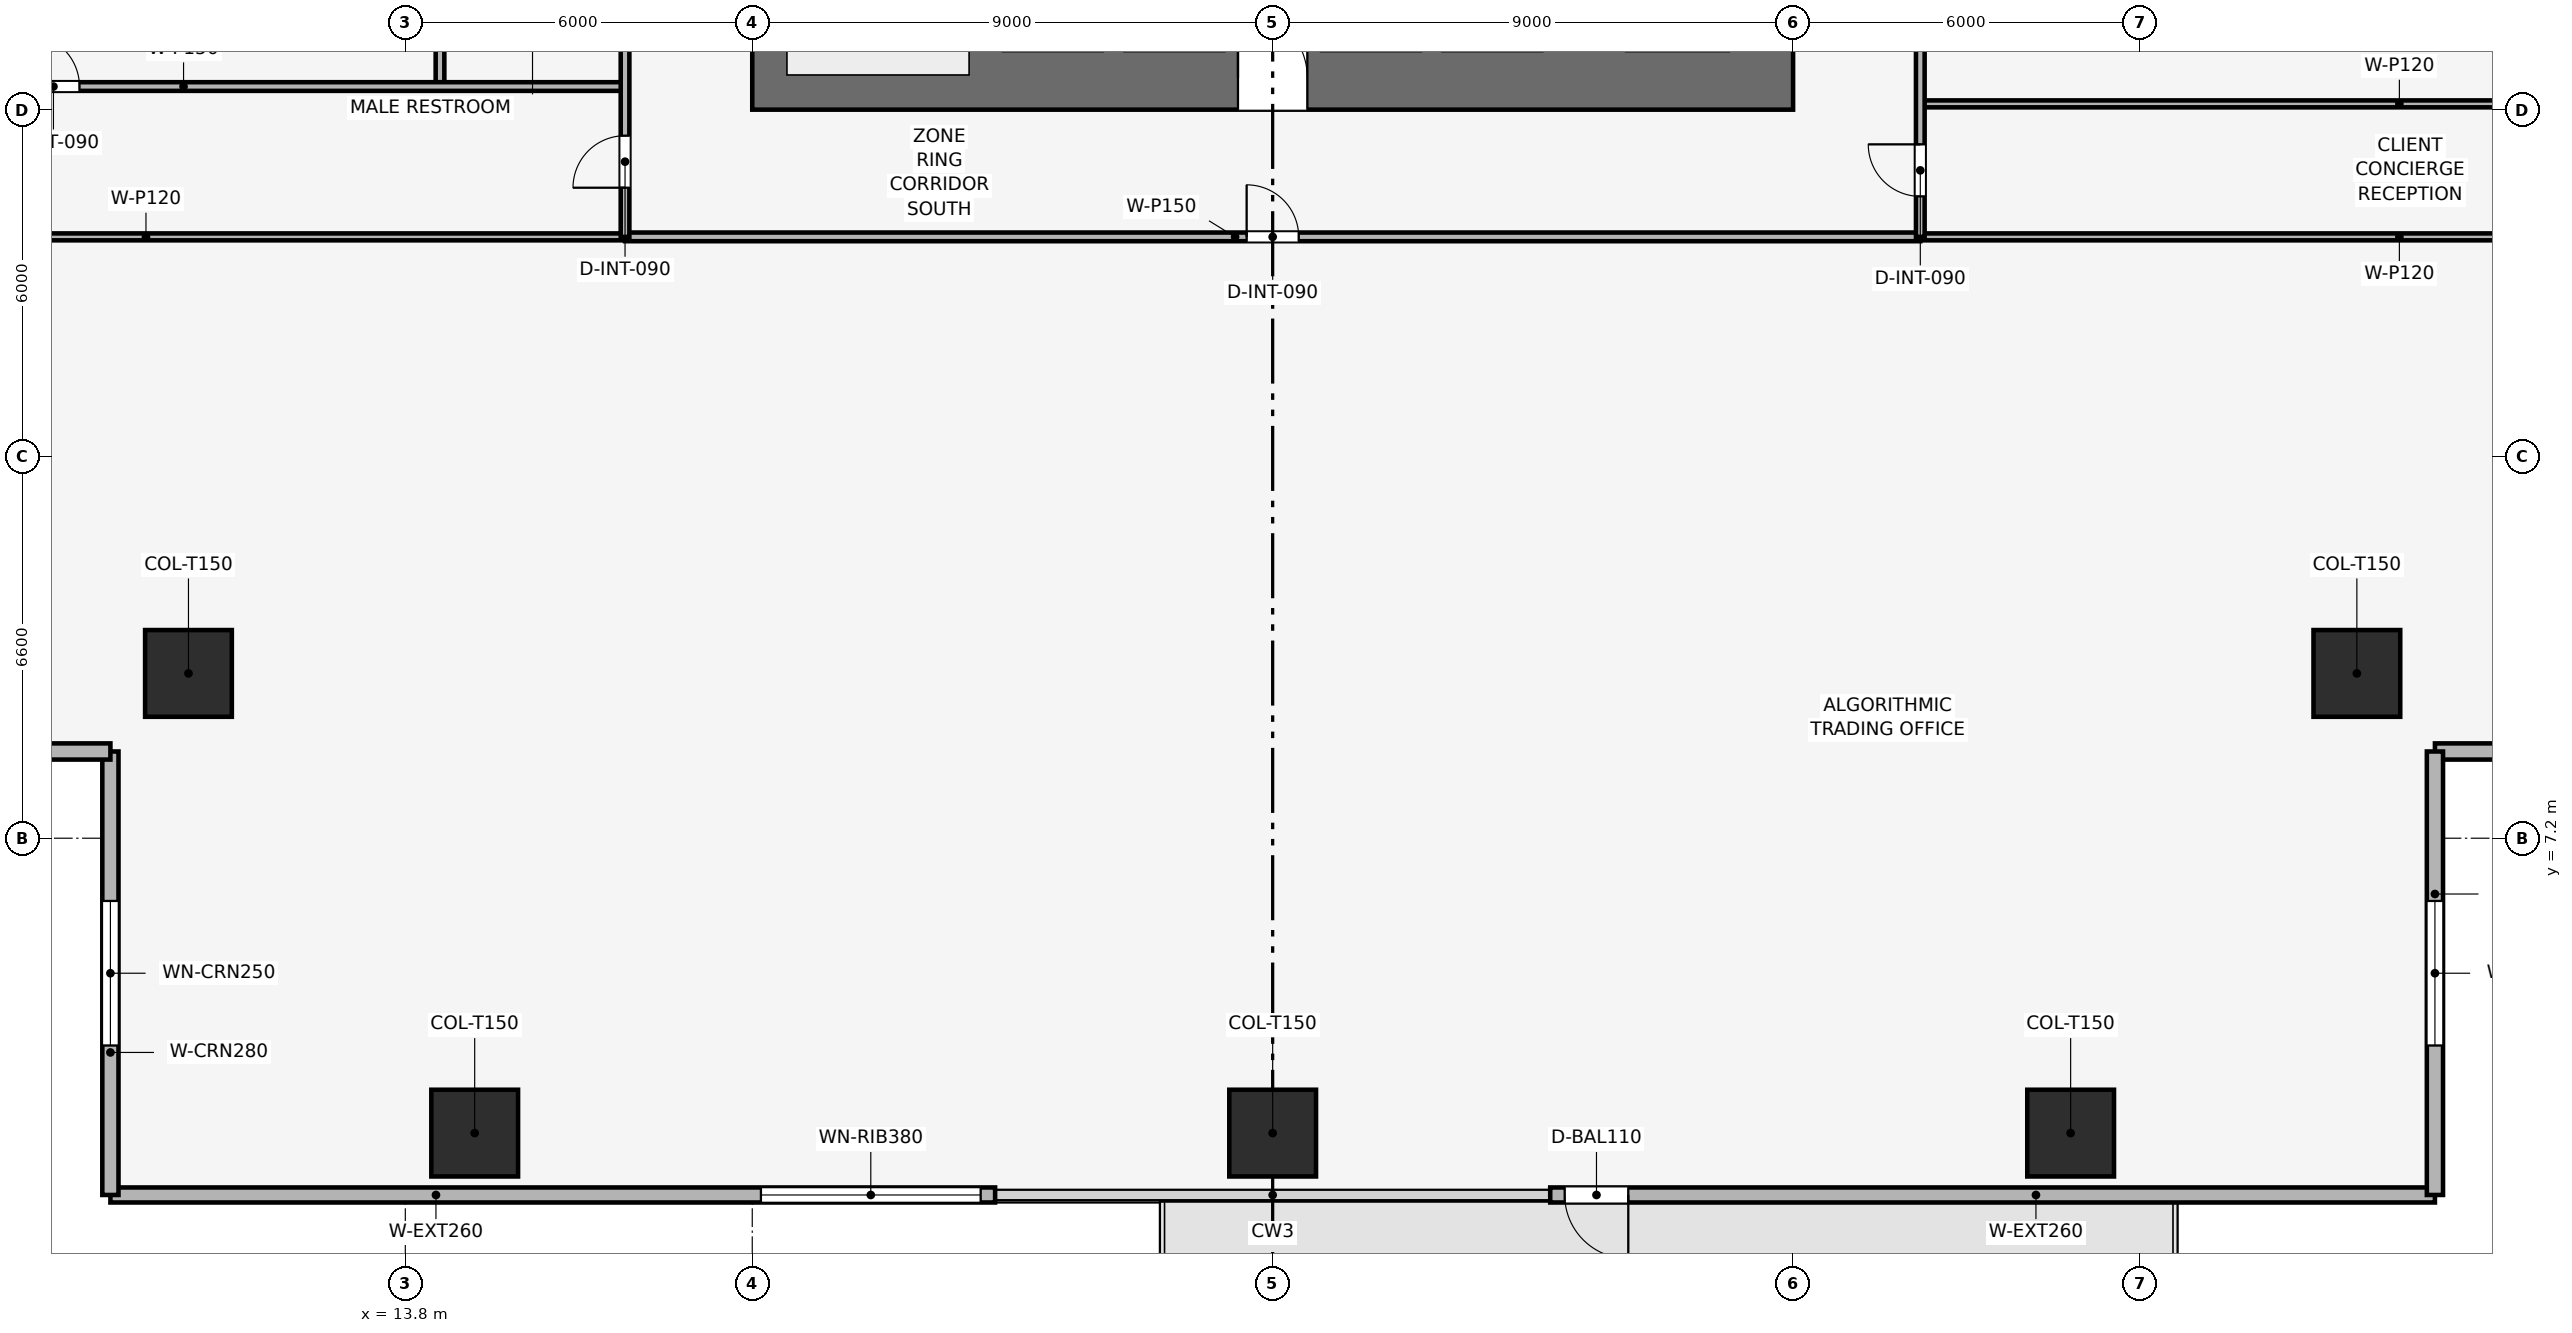
"""IFC4 building model, lengths in metres.
Left out: names, types, materials, properties, quantities, classifications, styles, units other than length and angle.
Written with IfcOpenShell. Run it as: python <this file> out.ifc"""

import sys

from ifc_helpers import new_model, si_unit, direction, frame, frame_2d, origin, origin_2d, place, context, subcontext, project, spatial, rectangle, extrude, element, fill, save


model = new_model("IFC4")
c1 = context("Model", 3, precision=1e-05, world=origin(), true_north=direction((0.0, 1.0)))
c2 = subcontext(c1, "Body", "Model", "MODEL_VIEW")
j1 = project(units=[si_unit("LENGTHUNIT", "METRE"), si_unit("PLANEANGLEUNIT", "RADIAN")], contexts=[c1])
p1 = place(None, origin())
s1 = spatial("IfcSite", under=j1, at=p1, CompositionType="ELEMENT")
p2 = place(p1, origin())
s2 = spatial("IfcBuilding", under=s1, at=p2, CompositionType="ELEMENT")
p3 = place(p2, frame((0.0, 0.0, 57.3)))
s3 = spatial("IfcBuildingStorey", under=s2, at=p3, CompositionType="ELEMENT", Elevation=57.3)
p4 = place(p3, frame((19.8, 20.35, 0.0), z_axis=(0.0, 0.0, 1.0), x_axis=(1.0, 0.0, 0.0)))
e1 = element("IfcWall", 1, at=p4, inside=s3, PredefinedType="SHEAR", context=c2, shape_type="SweptSolid", body=[
    extrude(rectangle(XDim=18.0, YDim=1.1, at=frame_2d((9.0, 0.0))), origin(), (0.0, 0.0, 1.0), 3.9),
])
p5 = place(p4, frame((8.4, 0.0, 0.0)))
e2 = element("IfcOpeningElement", 2, at=p5, cuts=e1, PredefinedType="OPENING", context=c2, shape_type="SweptSolid", body=[
    extrude(rectangle(XDim=1.2, YDim=2.2, at=frame_2d((0.6, 1.1))), frame((0.0, 0.56, 0.0), z_axis=(0.0, -1.0, 0.0), x_axis=(1.0, 0.0, 0.0)), (0.0, 0.0, 1.0), 1.12),
])
for number, where, z_axis, x_axis in (
    (3, (15.0, 2.1, 0.003), (0.0, 0.0, 1.0), (1.0, 0.0, 0.0)),
    (4, (28.8, 2.1, 0.003), (0.0, 0.0, 1.0), (1.0, 0.0, 0.0)),
    (5, (42.6, 2.1, 0.003), (0.0, 0.0, 1.0), (1.0, 0.0, 0.0)),
    (6, (10.05, 10.05, 0.003), (0.0, 0.0, 1.0), (1.0, 0.0, 0.0)),
    (7, (47.55, 10.05, 0.003), (0.0, 0.0, 1.0), (1.0, 0.0, 0.0)),
):
    element("IfcColumn", number, at=place(p3, frame(where, z_axis=z_axis, x_axis=x_axis)), inside=s3, PredefinedType="COLUMN", context=c2, shape_type="SweptSolid", body=[
        extrude(rectangle(XDim=1.5, YDim=1.5, at=origin_2d()), origin(), (0.0, 0.0, 1.0), 3.644),
    ])
p6 = place(p3, frame((48.9, 1.03, 0.0), z_axis=(0.0, 0.0, 1.0), x_axis=(-1.0, 0.0, 0.0)))
e8 = element("IfcWall", 8, at=p6, inside=s3, PredefinedType="SOLIDWALL", context=c2, shape_type="SweptSolid", body=[
    extrude(rectangle(XDim=15.3, YDim=0.26, at=frame_2d((7.65, 0.0))), origin(), (0.0, 0.0, 1.0), 3.65),
])
p7 = place(p6, frame((13.95, 0.0, 0.0)))
e9 = element("IfcOpeningElement", 9, at=p7, cuts=e8, PredefinedType="OPENING", context=c2, shape_type="SweptSolid", body=[
    extrude(rectangle(XDim=1.1, YDim=2.2, at=frame_2d((0.55, 1.1))), frame((0.0, 0.14, 0.0), z_axis=(0.0, -1.0, 0.0), x_axis=(1.0, 0.0, 0.0)), (0.0, 0.0, 1.0), 0.28),
])
p8 = place(p3, frame((24.0, 1.03, 0.0), z_axis=(0.0, 0.0, 1.0), x_axis=(-1.0, 0.0, 0.0)))
e10 = element("IfcWall", 10, at=p8, inside=s3, PredefinedType="SOLIDWALL", context=c2, shape_type="SweptSolid", body=[
    extrude(rectangle(XDim=15.3, YDim=0.26, at=frame_2d((7.65, 0.0))), origin(), (0.0, 0.0, 1.0), 3.65),
])
p9 = place(p8, frame((0.25, 0.0, 0.9)))
e11 = element("IfcOpeningElement", 11, at=p9, cuts=e10, PredefinedType="OPENING", context=c2, shape_type="SweptSolid", body=[
    extrude(rectangle(XDim=3.8, YDim=1.9, at=frame_2d((1.9, 0.95))), frame((0.0, 0.14, 0.0), z_axis=(0.0, -1.0, 0.0), x_axis=(1.0, 0.0, 0.0)), (0.0, 0.0, 1.0), 0.28),
])
p10 = place(p3, frame((8.7, 1.03, 0.0), z_axis=(0.0, 0.0, 1.0), x_axis=(0.0, 1.0, 0.0)))
e12 = element("IfcWall", 12, at=p10, inside=s3, PredefinedType="SOLIDWALL", context=c2, shape_type="SweptSolid", body=[
    extrude(rectangle(XDim=7.67, YDim=0.28, at=frame_2d((3.835, 0.0))), origin(), (0.0, 0.0, 1.0), 3.65),
])
p11 = place(p10, frame((2.585, 0.0, 0.9)))
e13 = element("IfcOpeningElement", 13, at=p11, cuts=e12, PredefinedType="OPENING", context=c2, shape_type="SweptSolid", body=[
    extrude(rectangle(XDim=2.5, YDim=1.9, at=frame_2d((1.25, 0.95))), frame((0.0, 0.15, 0.0), z_axis=(0.0, -1.0, 0.0), x_axis=(1.0, 0.0, 0.0)), (0.0, 0.0, 1.0), 0.3),
])
p12 = place(p3, frame((8.7, 8.7, 0.0), z_axis=(0.0, 0.0, 1.0), x_axis=(-1.0, 0.0, 0.0)))
e14 = element("IfcWall", 14, at=p12, inside=s3, PredefinedType="SOLIDWALL", context=c2, shape_type="SweptSolid", body=[
    extrude(rectangle(XDim=7.67, YDim=0.28, at=frame_2d((3.835, 0.0))), origin(), (0.0, 0.0, 1.0), 3.65),
])
p13 = place(p12, frame((2.585, 0.0, 0.9)))
e15 = element("IfcOpeningElement", 15, at=p13, cuts=e14, PredefinedType="OPENING", context=c2, shape_type="SweptSolid", body=[
    extrude(rectangle(XDim=2.5, YDim=1.9, at=frame_2d((1.25, 0.95))), frame((0.0, 0.15, 0.0), z_axis=(0.0, -1.0, 0.0), x_axis=(1.0, 0.0, 0.0)), (0.0, 0.0, 1.0), 0.3),
])
p14 = place(p3, frame((56.57, 8.7, 0.0), z_axis=(0.0, 0.0, 1.0), x_axis=(-1.0, 0.0, 0.0)))
e16 = element("IfcWall", 16, at=p14, inside=s3, PredefinedType="SOLIDWALL", context=c2, shape_type="SweptSolid", body=[
    extrude(rectangle(XDim=7.67, YDim=0.28, at=frame_2d((3.835, 0.0))), origin(), (0.0, 0.0, 1.0), 3.65),
])
p15 = place(p14, frame((2.585, 0.0, 0.9)))
e17 = element("IfcOpeningElement", 17, at=p15, cuts=e16, PredefinedType="OPENING", context=c2, shape_type="SweptSolid", body=[
    extrude(rectangle(XDim=2.5, YDim=1.9, at=frame_2d((1.25, 0.95))), frame((0.0, 0.15, 0.0), z_axis=(0.0, -1.0, 0.0), x_axis=(1.0, 0.0, 0.0)), (0.0, 0.0, 1.0), 0.3),
])
p16 = place(p3, frame((48.9, 8.7, 0.0), z_axis=(0.0, 0.0, 1.0), x_axis=(0.0, -1.0, 0.0)))
e18 = element("IfcWall", 18, at=p16, inside=s3, PredefinedType="SOLIDWALL", context=c2, shape_type="SweptSolid", body=[
    extrude(rectangle(XDim=7.67, YDim=0.28, at=frame_2d((3.835, 0.0))), origin(), (0.0, 0.0, 1.0), 3.65),
])
p17 = place(p16, frame((2.585, 0.0, 0.9)))
e19 = element("IfcOpeningElement", 19, at=p17, cuts=e18, PredefinedType="OPENING", context=c2, shape_type="SweptSolid", body=[
    extrude(rectangle(XDim=2.5, YDim=1.9, at=frame_2d((1.25, 0.95))), frame((0.0, 0.15, 0.0), z_axis=(0.0, -1.0, 0.0), x_axis=(1.0, 0.0, 0.0)), (0.0, 0.0, 1.0), 0.3),
])
for number, where, z_axis, x_axis in (
    (20, (1.03, 17.6, 0.0), (0.0, 0.0, 1.0), (1.0, 0.0, 0.0)),
    (21, (40.0, 17.6, 0.0), (0.0, 0.0, 1.0), (1.0, 0.0, 0.0)),
):
    element("IfcWall", number, at=place(p3, frame(where, z_axis=z_axis, x_axis=x_axis)), inside=s3, PredefinedType="PARTITIONING", context=c2, shape_type="SweptSolid", body=[
        extrude(rectangle(XDim=16.57, YDim=0.12, at=frame_2d((8.285, 0.0))), origin(), (0.0, 0.0, 1.0), 2.935),
    ])
p18 = place(p3, frame((14.4, 20.2, 0.0), z_axis=(0.0, 0.0, 1.0), x_axis=(0.0, 1.0, 0.0)))
e22 = element("IfcWall", 22, at=p18, inside=s3, PredefinedType="PARTITIONING", context=c2, shape_type="SweptSolid", body=[
    extrude(rectangle(XDim=8.4, YDim=0.15, at=frame_2d((4.2, 0.0))), origin(), (0.0, 0.0, 1.0), 3.085),
])
p19 = place(p3, frame((1.03, 20.2, 0.0), z_axis=(0.0, 0.0, 1.0), x_axis=(1.0, 0.0, 0.0)))
e23 = element("IfcWall", 23, at=p19, inside=s3, PredefinedType="PARTITIONING", context=c2, shape_type="SweptSolid", body=[
    extrude(rectangle(XDim=16.57, YDim=0.15, at=frame_2d((8.285, 0.0))), origin(), (0.0, 0.0, 1.0), 2.935),
])
p20 = place(p19, frame((6.235, 0.0, 0.0)))
e24 = element("IfcOpeningElement", 24, at=p20, cuts=e23, PredefinedType="OPENING", context=c2, shape_type="SweptSolid", body=[
    extrude(rectangle(XDim=0.9, YDim=2.1, at=frame_2d((0.45, 1.05))), frame((0.0, 0.085, 0.0), z_axis=(0.0, -1.0, 0.0), x_axis=(1.0, 0.0, 0.0)), (0.0, 0.0, 1.0), 0.17),
])
p21 = place(p3, frame((40.0, 19.9, 0.0), z_axis=(0.0, 0.0, 1.0), x_axis=(1.0, 0.0, 0.0)))
e25 = element("IfcWall", 25, at=p21, inside=s3, PredefinedType="PARTITIONING", context=c2, shape_type="SweptSolid", body=[
    extrude(rectangle(XDim=16.57, YDim=0.12, at=frame_2d((8.285, 0.0))), origin(), (0.0, 0.0, 1.0), 2.935),
])
p22 = place(p3, frame((17.6, 17.6, 0.0), z_axis=(0.0, 0.0, 1.0), x_axis=(1.0, 0.0, 0.0)))
e26 = element("IfcWall", 26, at=p22, inside=s3, PredefinedType="PARTITIONING", context=c2, shape_type="SweptSolid", body=[
    extrude(rectangle(XDim=22.4, YDim=0.15, at=frame_2d((11.2, 0.0))), origin(), (0.0, 0.0, 1.0), 3.085),
])
p23 = place(p22, frame((10.75, 0.0, 0.0)))
e27 = element("IfcOpeningElement", 27, at=p23, cuts=e26, PredefinedType="OPENING", context=c2, shape_type="SweptSolid", body=[
    extrude(rectangle(XDim=0.9, YDim=2.1, at=frame_2d((0.45, 1.05))), frame((0.0, 0.085, 0.0), z_axis=(0.0, -1.0, 0.0), x_axis=(1.0, 0.0, 0.0)), (0.0, 0.0, 1.0), 0.17),
])
p24 = place(p3, frame((17.6, 17.6, 0.0), z_axis=(0.0, 0.0, 1.0), x_axis=(0.0, 1.0, 0.0)))
e28 = element("IfcWall", 28, at=p24, inside=s3, PredefinedType="PARTITIONING", context=c2, shape_type="SweptSolid", body=[
    extrude(rectangle(XDim=22.4, YDim=0.15, at=frame_2d((11.2, 0.0))), origin(), (0.0, 0.0, 1.0), 3.085),
])
p25 = place(p24, frame((0.85, 0.0, 0.0)))
e29 = element("IfcOpeningElement", 29, at=p25, cuts=e28, PredefinedType="OPENING", context=c2, shape_type="SweptSolid", body=[
    extrude(rectangle(XDim=0.9, YDim=2.1, at=frame_2d((0.45, 1.05))), frame((0.0, 0.085, 0.0), z_axis=(0.0, -1.0, 0.0), x_axis=(1.0, 0.0, 0.0)), (0.0, 0.0, 1.0), 0.17),
])
p26 = place(p24, frame((3.55, 0.0, 0.0)))
e30 = element("IfcOpeningElement", 30, at=p26, cuts=e28, PredefinedType="OPENING", context=c2, shape_type="SweptSolid", body=[
    extrude(rectangle(XDim=0.9, YDim=2.1, at=frame_2d((0.45, 1.05))), frame((0.0, 0.085, 0.0), z_axis=(0.0, -1.0, 0.0), x_axis=(1.0, 0.0, 0.0)), (0.0, 0.0, 1.0), 0.17),
])
p27 = place(p24, frame((6.45, 0.0, 0.0)))
e31 = element("IfcOpeningElement", 31, at=p27, cuts=e28, PredefinedType="OPENING", context=c2, shape_type="SweptSolid", body=[
    extrude(rectangle(XDim=0.9, YDim=2.1, at=frame_2d((0.45, 1.05))), frame((0.0, 0.085, 0.0), z_axis=(0.0, -1.0, 0.0), x_axis=(1.0, 0.0, 0.0)), (0.0, 0.0, 1.0), 0.17),
])
p28 = place(p24, frame((9.2, 0.0, 0.0)))
e32 = element("IfcOpeningElement", 32, at=p28, cuts=e28, PredefinedType="OPENING", context=c2, shape_type="SweptSolid", body=[
    extrude(rectangle(XDim=0.95, YDim=2.1, at=frame_2d((0.475, 1.05))), frame((0.0, 0.085, 0.0), z_axis=(0.0, -1.0, 0.0), x_axis=(1.0, 0.0, 0.0)), (0.0, 0.0, 1.0), 0.17),
])
p29 = place(p24, frame((16.25, 0.0, 0.0)))
e33 = element("IfcOpeningElement", 33, at=p29, cuts=e28, PredefinedType="OPENING", context=c2, shape_type="SweptSolid", body=[
    extrude(rectangle(XDim=0.9, YDim=2.1, at=frame_2d((0.45, 1.05))), frame((0.0, 0.085, 0.0), z_axis=(0.0, -1.0, 0.0), x_axis=(1.0, 0.0, 0.0)), (0.0, 0.0, 1.0), 0.17),
])
p30 = place(p3, frame((40.0, 17.6, 0.0), z_axis=(0.0, 0.0, 1.0), x_axis=(0.0, 1.0, 0.0)))
e34 = element("IfcWall", 34, at=p30, inside=s3, PredefinedType="PARTITIONING", context=c2, shape_type="SweptSolid", body=[
    extrude(rectangle(XDim=22.4, YDim=0.15, at=frame_2d((11.2, 0.0))), origin(), (0.0, 0.0, 1.0), 3.085),
])
p31 = place(p30, frame((0.7, 0.0, 0.0)))
e35 = element("IfcOpeningElement", 35, at=p31, cuts=e34, PredefinedType="OPENING", context=c2, shape_type="SweptSolid", body=[
    extrude(rectangle(XDim=0.9, YDim=2.1, at=frame_2d((0.45, 1.05))), frame((0.0, 0.085, 0.0), z_axis=(0.0, -1.0, 0.0), x_axis=(1.0, 0.0, 0.0)), (0.0, 0.0, 1.0), 0.17),
])
p32 = place(p30, frame((6.404, 0.0, 0.0)))
e36 = element("IfcOpeningElement", 36, at=p32, cuts=e34, PredefinedType="OPENING", context=c2, shape_type="SweptSolid", body=[
    extrude(rectangle(XDim=0.9, YDim=2.1, at=frame_2d((0.45, 1.05))), frame((0.0, 0.085, 0.0), z_axis=(0.0, -1.0, 0.0), x_axis=(1.0, 0.0, 0.0)), (0.0, 0.0, 1.0), 0.17),
])
p33 = place(p30, frame((16.454, 0.0, 0.0)))
e37 = element("IfcOpeningElement", 37, at=p33, cuts=e34, PredefinedType="OPENING", context=c2, shape_type="SweptSolid", body=[
    extrude(rectangle(XDim=0.9, YDim=2.1, at=frame_2d((0.45, 1.05))), frame((0.0, 0.085, 0.0), z_axis=(0.0, -1.0, 0.0), x_axis=(1.0, 0.0, 0.0)), (0.0, 0.0, 1.0), 0.17),
])
p34 = place(p7, origin())
e38 = element("IfcDoor", 38, at=p34, inside=s3, OperationType="SINGLE_SWING_LEFT", PredefinedType="DOOR", context=c2, shape_type="SweptSolid", body=[
    extrude(rectangle(XDim=1.1, YDim=2.2, at=frame_2d((0.55, 1.1))), frame((0.0, 0.025, 0.0), z_axis=(0.0, -1.0, 0.0), x_axis=(1.0, 0.0, 0.0)), (0.0, 0.0, 1.0), 0.05),
])
fill(e9, e38)
p35 = place(p9, origin())
e39 = element("IfcWindow", 39, at=p35, inside=s3, PartitioningType="SINGLE_PANEL", PredefinedType="WINDOW", context=c2, shape_type="SweptSolid", body=[
    extrude(rectangle(XDim=3.8, YDim=1.9, at=frame_2d((1.9, 0.95))), frame((0.0, 0.03, 0.0), z_axis=(0.0, -1.0, 0.0), x_axis=(1.0, 0.0, 0.0)), (0.0, 0.0, 1.0), 0.06),
])
fill(e11, e39)
p36 = place(p11, origin())
e40 = element("IfcWindow", 40, at=p36, inside=s3, PartitioningType="SINGLE_PANEL", PredefinedType="WINDOW", context=c2, shape_type="SweptSolid", body=[
    extrude(rectangle(XDim=2.5, YDim=1.9, at=frame_2d((1.25, 0.95))), frame((0.0, 0.03, 0.0), z_axis=(0.0, -1.0, 0.0), x_axis=(1.0, 0.0, 0.0)), (0.0, 0.0, 1.0), 0.06),
])
fill(e13, e40)
p37 = place(p17, origin())
e41 = element("IfcWindow", 41, at=p37, inside=s3, PartitioningType="SINGLE_PANEL", PredefinedType="WINDOW", context=c2, shape_type="SweptSolid", body=[
    extrude(rectangle(XDim=2.5, YDim=1.9, at=frame_2d((1.25, 0.95))), frame((0.0, 0.03, 0.0), z_axis=(0.0, -1.0, 0.0), x_axis=(1.0, 0.0, 0.0)), (0.0, 0.0, 1.0), 0.06),
])
fill(e19, e41)
p38 = place(p20, origin())
e42 = element("IfcDoor", 42, at=p38, inside=s3, OperationType="SINGLE_SWING_LEFT", PredefinedType="DOOR", context=c2, shape_type="SweptSolid", body=[
    extrude(rectangle(XDim=0.9, YDim=2.1, at=frame_2d((0.45, 1.05))), frame((0.0, 0.025, 0.0), z_axis=(0.0, -1.0, 0.0), x_axis=(1.0, 0.0, 0.0)), (0.0, 0.0, 1.0), 0.05),
])
fill(e24, e42)
p39 = place(p23, origin())
e43 = element("IfcDoor", 43, at=p39, inside=s3, OperationType="SINGLE_SWING_LEFT", PredefinedType="DOOR", context=c2, shape_type="SweptSolid", body=[
    extrude(rectangle(XDim=0.9, YDim=2.1, at=frame_2d((0.45, 1.05))), frame((0.0, 0.025, 0.0), z_axis=(0.0, -1.0, 0.0), x_axis=(1.0, 0.0, 0.0)), (0.0, 0.0, 1.0), 0.05),
])
fill(e27, e43)
p40 = place(p25, origin())
e44 = element("IfcDoor", 44, at=p40, inside=s3, OperationType="SINGLE_SWING_LEFT", PredefinedType="DOOR", context=c2, shape_type="SweptSolid", body=[
    extrude(rectangle(XDim=0.9, YDim=2.1, at=frame_2d((0.45, 1.05))), frame((0.0, 0.025, 0.0), z_axis=(0.0, -1.0, 0.0), x_axis=(1.0, 0.0, 0.0)), (0.0, 0.0, 1.0), 0.05),
])
fill(e29, e44)
p41 = place(p31, origin())
e45 = element("IfcDoor", 45, at=p41, inside=s3, OperationType="SINGLE_SWING_RIGHT", PredefinedType="DOOR", context=c2, shape_type="SweptSolid", body=[
    extrude(rectangle(XDim=0.9, YDim=2.1, at=frame_2d((0.45, 1.05))), frame((0.0, 0.025, 0.0), z_axis=(0.0, -1.0, 0.0), x_axis=(1.0, 0.0, 0.0)), (0.0, 0.0, 1.0), 0.05),
])
fill(e35, e45)
p42 = place(p5, origin())
e46 = element("IfcDoor", 46, at=p42, inside=s3, OperationType="SINGLE_SWING_LEFT", PredefinedType="DOOR", context=c2, shape_type="SweptSolid", body=[
    extrude(rectangle(XDim=1.2, YDim=2.2, at=frame_2d((0.6, 1.1))), frame((0.0, 0.025, 0.0), z_axis=(0.0, -1.0, 0.0), x_axis=(1.0, 0.0, 0.0)), (0.0, 0.0, 1.0), 0.05),
])
fill(e2, e46)
save(model, sys.argv[1])
